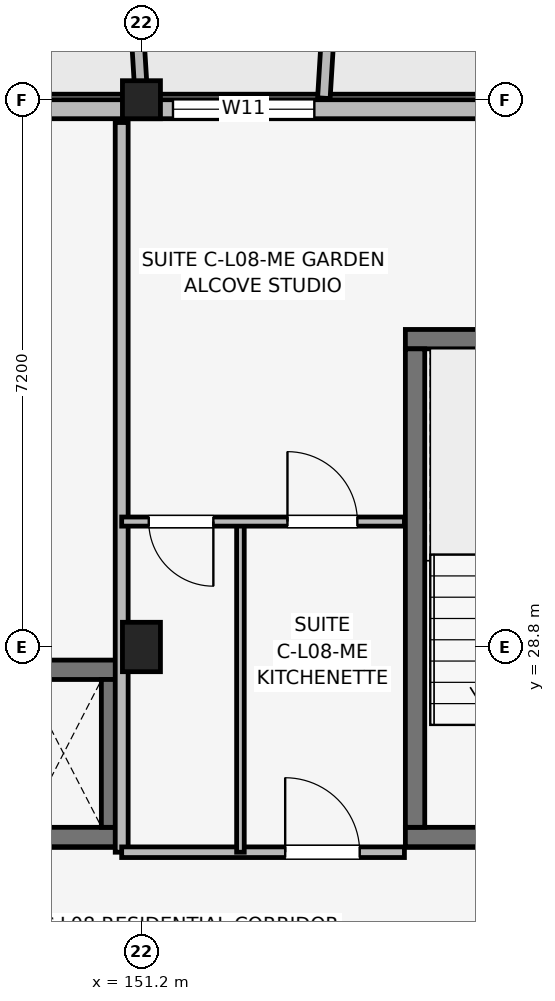
"""IFC4 building model, lengths in metres.
Left out: names, types, materials, properties, quantities, classifications, styles, units other than length and angle.
Written with IfcOpenShell. Run it as: python <this file> out.ifc"""

import sys

from ifc_helpers import new_model, si_unit, direction, frame, frame_2d, origin, origin_2d, place, context, subcontext, project, spatial, rectangle, extrude, element, fill, save


model = new_model("IFC4")
c1 = context("Model", 3, precision=1e-05, world=origin(), true_north=direction((0.0, 1.0)))
c2 = subcontext(c1, "Body", "Model", "MODEL_VIEW")
j1 = project(units=[si_unit("LENGTHUNIT", "METRE"), si_unit("PLANEANGLEUNIT", "RADIAN")], contexts=[c1])
p1 = place(None, origin())
s1 = spatial("IfcSite", under=j1, at=p1, CompositionType="ELEMENT")
p2 = place(p1, origin())
s2 = spatial("IfcBuilding", under=s1, at=p2, CompositionType="ELEMENT")
p3 = place(p2, frame((0.0, 0.0, 27.6)))
s3 = spatial("IfcBuildingStorey", under=s2, at=p3, CompositionType="ELEMENT", Elevation=27.6)
p4 = place(p3, frame((151.2, 28.8, 0.0), z_axis=(0.0, 0.0, 1.0), x_axis=(1.0, 0.0, 0.0)))
e1 = element("IfcColumn", 1, at=p4, inside=s3, PredefinedType="COLUMN", context=c2, shape_type="SweptSolid", body=[
    extrude(rectangle(XDim=0.5, YDim=0.65, at=origin_2d()), origin(), (0.0, 0.0, 1.0), 3.15),
])
p5 = place(p3, frame((151.2, 36.0, 0.0), z_axis=(0.0, 0.0, 1.0), x_axis=(1.0, 0.0, 0.0)))
e2 = element("IfcColumn", 2, at=p5, inside=s3, PredefinedType="COLUMN", context=c2, shape_type="SweptSolid", body=[
    extrude(rectangle(XDim=0.5, YDim=0.5, at=origin_2d()), origin(), (0.0, 0.0, 1.0), 3.15),
])
p6 = place(p3, frame((154.673, 26.3, 0.0), z_axis=(0.0, 0.0, 1.0), x_axis=(1.0, 0.0, 0.0)))
e3 = element("IfcWall", 3, at=p6, inside=s3, PredefinedType="SHEAR", context=c2, shape_type="SweptSolid", body=[
    extrude(rectangle(XDim=3.305, YDim=0.255, at=frame_2d((1.652, 0.0))), origin(), (0.0, 0.0, 1.0), 3.15),
])
p7 = place(p6, frame((1.127, 0.0, 0.0)))
e4 = element("IfcOpeningElement", 4, at=p7, cuts=e3, PredefinedType="OPENING", context=c2, shape_type="SweptSolid", body=[
    extrude(rectangle(XDim=1.05, YDim=2.12, at=frame_2d((0.525, 1.06))), frame((0.0, 0.137, 0.0), z_axis=(0.0, -1.0, 0.0), x_axis=(1.0, 0.0, 0.0)), (0.0, 0.0, 1.0), 0.275),
])
p8 = place(p3, frame((154.673, 32.85, 0.0), z_axis=(0.0, 0.0, 1.0), x_axis=(1.0, 0.0, 0.0)))
e5 = element("IfcWall", 5, at=p8, inside=s3, PredefinedType="SHEAR", context=c2, shape_type="SweptSolid", body=[
    extrude(rectangle(XDim=3.305, YDim=0.255, at=frame_2d((1.652, 0.0))), origin(), (0.0, 0.0, 1.0), 3.15),
])
p9 = place(p3, frame((154.8, 26.427, 0.0), z_axis=(0.0, 0.0, 1.0), x_axis=(0.0, 1.0, 0.0)))
e6 = element("IfcWall", 6, at=p9, inside=s3, PredefinedType="SHEAR", context=c2, shape_type="SweptSolid", body=[
    extrude(rectangle(XDim=6.295, YDim=0.255, at=frame_2d((3.147, 0.0))), origin(), (0.0, 0.0, 1.0), 3.15),
])
for number, where, z_axis, x_axis in (
    (7, (149.123, 26.3, 0.0), (0.0, 0.0, 1.0), (1.0, 0.0, 0.0)),
    (8, (149.123, 28.5, 0.0), (0.0, 0.0, 1.0), (1.0, 0.0, 0.0)),
):
    element("IfcWall", number, at=place(p3, frame(where, z_axis=z_axis, x_axis=x_axis)), inside=s3, PredefinedType="SHEAR", context=c2, shape_type="SweptSolid", body=[
        extrude(rectangle(XDim=1.805, YDim=0.255, at=frame_2d((0.902, 0.0))), origin(), (0.0, 0.0, 1.0), 3.15),
    ])
p10 = place(p3, frame((150.8, 26.427, 0.0), z_axis=(0.0, 0.0, 1.0), x_axis=(0.0, 1.0, 0.0)))
e9 = element("IfcWall", 9, at=p10, inside=s3, PredefinedType="SHEAR", context=c2, shape_type="SweptSolid", body=[
    extrude(rectangle(XDim=1.945, YDim=0.255, at=frame_2d((0.973, 0.0))), origin(), (0.0, 0.0, 1.0), 3.15),
])
p11 = place(p3, frame((162.6, 35.875, 0.0), z_axis=(0.0, 0.0, 1.0), x_axis=(-1.0, 0.0, 0.0)))
e10 = element("IfcWall", 10, at=p11, inside=s3, PredefinedType="SOLIDWALL", context=c2, shape_type="SweptSolid", body=[
    extrude(rectangle(XDim=30.0, YDim=0.25, at=frame_2d((15.0, 0.0))), origin(), (0.0, 0.0, 1.0), 2.43),
])
p12 = place(p11, frame((27.95, 0.0, 0.0), z_axis=(0.0, 0.0, 1.0), x_axis=(-1.0, 0.0, 0.0)))
e11 = element("IfcOpeningElement", 11, at=p12, cuts=e10, PredefinedType="OPENING", context=c2, shape_type="SweptSolid", body=[
    extrude(rectangle(XDim=1.5, YDim=2.15, at=frame_2d((0.75, 1.075))), frame((0.0, 0.135, 0.0), z_axis=(0.0, -1.0, 0.0), x_axis=(1.0, 0.0, 0.0)), (0.0, 0.0, 1.0), 0.27),
])
p13 = place(p11, frame((3.55, 0.0, 0.0), z_axis=(0.0, 0.0, 1.0), x_axis=(-1.0, 0.0, 0.0)))
e12 = element("IfcOpeningElement", 12, at=p13, cuts=e10, PredefinedType="OPENING", context=c2, shape_type="SweptSolid", body=[
    extrude(rectangle(XDim=1.5, YDim=2.15, at=frame_2d((0.75, 1.075))), frame((0.0, 0.135, 0.0), z_axis=(0.0, -1.0, 0.0), x_axis=(1.0, 0.0, 0.0)), (0.0, 0.0, 1.0), 0.27),
])
p14 = place(p11, frame((14.425, 0.0, 0.5)))
e13 = element("IfcOpeningElement", 13, at=p14, cuts=e10, PredefinedType="OPENING", context=c2, shape_type="SweptSolid", body=[
    extrude(rectangle(XDim=1.15, YDim=1.68, at=frame_2d((0.575, 0.84))), frame((0.0, 0.135, 0.0), z_axis=(0.0, -1.0, 0.0), x_axis=(1.0, 0.0, 0.0)), (0.0, 0.0, 1.0), 0.27),
])
p15 = place(p11, frame((9.125, 0.0, 0.7)))
e14 = element("IfcOpeningElement", 14, at=p15, cuts=e10, PredefinedType="OPENING", context=c2, shape_type="SweptSolid", body=[
    extrude(rectangle(XDim=1.86, YDim=1.6, at=frame_2d((0.93, 0.8))), frame((0.0, 0.135, 0.0), z_axis=(0.0, -1.0, 0.0), x_axis=(1.0, 0.0, 0.0)), (0.0, 0.0, 1.0), 0.27),
])
p16 = place(p11, frame((19.015, 0.0, 0.7)))
e15 = element("IfcOpeningElement", 15, at=p16, cuts=e10, PredefinedType="OPENING", context=c2, shape_type="SweptSolid", body=[
    extrude(rectangle(XDim=1.86, YDim=1.6, at=frame_2d((0.93, 0.8))), frame((0.0, 0.135, 0.0), z_axis=(0.0, -1.0, 0.0), x_axis=(1.0, 0.0, 0.0)), (0.0, 0.0, 1.0), 0.27),
])
p17 = place(p3, frame((151.2, 36.02, 0.0), z_axis=(0.0, 0.0, 1.0), x_axis=(-0.061046865508, 0.998134900808, 0.0)))
e16 = element("IfcWall", 16, at=p17, inside=s3, PredefinedType="ELEMENTEDWALL", context=c2, shape_type="SweptSolid", body=[
    extrude(rectangle(XDim=1.964, YDim=0.165, at=frame_2d((0.982, 0.0))), origin(), (0.0, 0.0, 1.0), 2.95),
])
p18 = place(p3, frame((153.6, 36.02, 0.0), z_axis=(0.0, 0.0, 1.0), x_axis=(0.061046865508, 0.998134900808, 0.0)))
e17 = element("IfcWall", 17, at=p18, inside=s3, PredefinedType="ELEMENTEDWALL", context=c2, shape_type="SweptSolid", body=[
    extrude(rectangle(XDim=1.964, YDim=0.165, at=frame_2d((0.982, 0.0))), origin(), (0.0, 0.0, 1.0), 2.55),
])
p19 = place(p3, frame((150.94, 26.1, 0.0), z_axis=(0.0, 0.0, 1.0), x_axis=(0.0, 1.0, 0.0)))
e18 = element("IfcWall", 18, at=p19, inside=s3, PredefinedType="PARTITIONING", context=c2, shape_type="SweptSolid", body=[
    extrude(rectangle(XDim=9.6, YDim=0.17, at=frame_2d((4.8, 0.0))), origin(), (0.0, 0.0, 1.0), 2.38),
])
p20 = place(p3, frame((150.94, 26.1, 0.0), z_axis=(0.0, 0.0, 1.0), x_axis=(1.0, 0.0, 0.0)))
e19 = element("IfcWall", 19, at=p20, inside=s3, PredefinedType="PARTITIONING", context=c2, shape_type="SweptSolid", body=[
    extrude(rectangle(XDim=3.72, YDim=0.14, at=frame_2d((1.86, 0.0))), origin(), (0.0, 0.0, 1.0), 2.38),
])
p21 = place(p20, frame((2.151, 0.0, 0.0)))
e20 = element("IfcOpeningElement", 20, at=p21, cuts=e19, PredefinedType="OPENING", context=c2, shape_type="SweptSolid", body=[
    extrude(rectangle(XDim=0.98, YDim=2.1, at=frame_2d((0.49, 1.05))), frame((0.0, 0.08, 0.0), z_axis=(0.0, -1.0, 0.0), x_axis=(1.0, 0.0, 0.0)), (0.0, 0.0, 1.0), 0.16),
])
p22 = place(p3, frame((152.502, 26.1, 0.0), z_axis=(0.0, 0.0, 1.0), x_axis=(0.0, 1.0, 0.0)))
e21 = element("IfcWall", 21, at=p22, inside=s3, PredefinedType="PARTITIONING", context=c2, shape_type="SweptSolid", body=[
    extrude(rectangle(XDim=4.35, YDim=0.1, at=frame_2d((2.175, 0.0))), origin(), (0.0, 0.0, 1.0), 2.38),
])
p23 = place(p3, frame((150.94, 30.45, 0.0), z_axis=(0.0, 0.0, 1.0), x_axis=(1.0, 0.0, 0.0)))
e22 = element("IfcWall", 22, at=p23, inside=s3, PredefinedType="PARTITIONING", context=c2, shape_type="SweptSolid", body=[
    extrude(rectangle(XDim=3.72, YDim=0.12, at=frame_2d((1.86, 0.0))), origin(), (0.0, 0.0, 1.0), 2.38),
])
p24 = place(p23, frame((1.206, 0.0, 0.0), z_axis=(0.0, 0.0, 1.0), x_axis=(-1.0, 0.0, 0.0)))
e23 = element("IfcOpeningElement", 23, at=p24, cuts=e22, PredefinedType="OPENING", context=c2, shape_type="SweptSolid", body=[
    extrude(rectangle(XDim=0.85, YDim=2.08, at=frame_2d((0.425, 1.04))), frame((0.0, 0.07, 0.0), z_axis=(0.0, -1.0, 0.0), x_axis=(1.0, 0.0, 0.0)), (0.0, 0.0, 1.0), 0.14),
])
p25 = place(p23, frame((2.181, 0.0, 0.0)))
e24 = element("IfcOpeningElement", 24, at=p25, cuts=e22, PredefinedType="OPENING", context=c2, shape_type="SweptSolid", body=[
    extrude(rectangle(XDim=0.92, YDim=2.08, at=frame_2d((0.46, 1.04))), frame((0.0, 0.07, 0.0), z_axis=(0.0, -1.0, 0.0), x_axis=(1.0, 0.0, 0.0)), (0.0, 0.0, 1.0), 0.14),
])
p26 = place(p15, origin())
e25 = element("IfcWindow", 25, at=p26, inside=s3, PartitioningType="SINGLE_PANEL", PredefinedType="WINDOW", context=c2, shape_type="SweptSolid", body=[
    extrude(rectangle(XDim=1.86, YDim=1.6, at=frame_2d((0.93, 0.8))), frame((0.0, 0.03, 0.0), z_axis=(0.0, -1.0, 0.0), x_axis=(1.0, 0.0, 0.0)), (0.0, 0.0, 1.0), 0.06),
])
fill(e14, e25)
p27 = place(p21, origin())
e26 = element("IfcDoor", 26, at=p27, inside=s3, OperationType="SINGLE_SWING_LEFT", PredefinedType="DOOR", context=c2, shape_type="SweptSolid", body=[
    extrude(rectangle(XDim=0.98, YDim=2.1, at=frame_2d((0.49, 1.05))), frame((0.0, 0.025, 0.0), z_axis=(0.0, -1.0, 0.0), x_axis=(1.0, 0.0, 0.0)), (0.0, 0.0, 1.0), 0.05),
])
fill(e20, e26)
p28 = place(p24, origin())
e27 = element("IfcDoor", 27, at=p28, inside=s3, OperationType="SINGLE_SWING_RIGHT", PredefinedType="DOOR", context=c2, shape_type="SweptSolid", body=[
    extrude(rectangle(XDim=0.85, YDim=2.08, at=frame_2d((0.425, 1.04))), frame((0.0, 0.025, 0.0), z_axis=(0.0, -1.0, 0.0), x_axis=(1.0, 0.0, 0.0)), (0.0, 0.0, 1.0), 0.05),
])
fill(e23, e27)
p29 = place(p25, origin())
e28 = element("IfcDoor", 28, at=p29, inside=s3, OperationType="SINGLE_SWING_LEFT", PredefinedType="DOOR", context=c2, shape_type="SweptSolid", body=[
    extrude(rectangle(XDim=0.92, YDim=2.08, at=frame_2d((0.46, 1.04))), frame((0.0, 0.025, 0.0), z_axis=(0.0, -1.0, 0.0), x_axis=(1.0, 0.0, 0.0)), (0.0, 0.0, 1.0), 0.05),
])
fill(e24, e28)
save(model, sys.argv[1])
